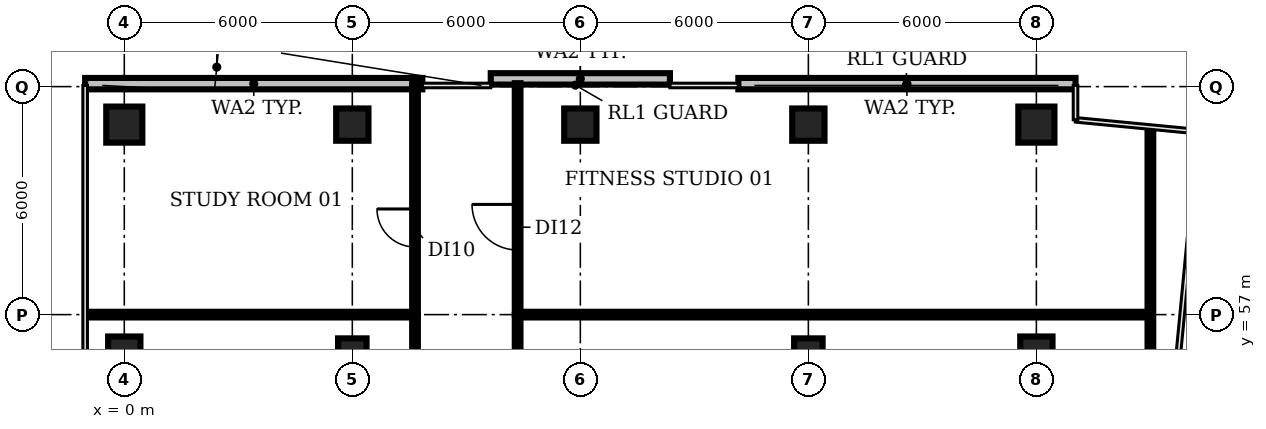
"""IFC4 building model, lengths in metres.
Left out: names, types, materials, properties, quantities, classifications, styles, units other than length and angle.
Written with IfcOpenShell. Run it as: python <this file> out.ifc"""

import sys

from ifc_helpers import new_model, si_unit, direction, frame, frame_2d, origin, origin_2d, place, context, subcontext, project, spatial, rectangle, circle, extrude, element, fill, save


model = new_model("IFC4")
c1 = context("Model", 3, precision=1e-05, world=origin(), true_north=direction((0.0, 1.0)))
c2 = subcontext(c1, "Body", "Model", "MODEL_VIEW")
j1 = project(units=[si_unit("LENGTHUNIT", "METRE"), si_unit("PLANEANGLEUNIT", "RADIAN")], contexts=[c1])
p1 = place(None, origin())
s1 = spatial("IfcSite", under=j1, at=p1, CompositionType="ELEMENT")
p2 = place(p1, origin())
s2 = spatial("IfcBuilding", under=s1, at=p2, CompositionType="ELEMENT")
p3 = place(p2, frame((0.0, 0.0, 264.2)))
s3 = spatial("IfcBuildingStorey", under=s2, at=p3, CompositionType="ELEMENT", Elevation=264.2)
p4 = place(p3, frame((0.0, 56.0, -0.35), z_axis=(0.0, 0.0, 1.0), x_axis=(1.0, 0.0, 0.0)))
e1 = element("IfcColumn", 1, at=p4, inside=s3, PredefinedType="COLUMN", context=c2, shape_type="SweptSolid", body=[
    extrude(rectangle(XDim=0.85, YDim=0.85, at=origin_2d()), origin(), (0.0, 0.0, 1.0), 4.2),
])
p5 = place(p3, frame((0.0, 62.0, -0.35), z_axis=(0.0, 0.0, 1.0), x_axis=(1.0, 0.0, 0.0)))
e2 = element("IfcColumn", 2, at=p5, inside=s3, PredefinedType="COLUMN", context=c2, shape_type="SweptSolid", body=[
    extrude(circle(Radius=0.475, at=origin_2d()), origin(), (0.0, 0.0, 1.0), 4.2),
])
p6 = place(p3, frame((6.0, 56.0, -0.35), z_axis=(0.0, 0.0, 1.0), x_axis=(1.0, 0.0, 0.0)))
e3 = element("IfcColumn", 3, at=p6, inside=s3, PredefinedType="COLUMN", context=c2, shape_type="SweptSolid", body=[
    extrude(rectangle(XDim=0.75, YDim=0.75, at=origin_2d()), origin(), (0.0, 0.0, 1.0), 4.2),
])
for number, where, z_axis, x_axis in (
    (4, (6.0, 62.0, -0.35), (0.0, 0.0, 1.0), (1.0, 0.0, 0.0)),
    (5, (12.0, 62.0, -0.35), (0.0, 0.0, 1.0), (1.0, 0.0, 0.0)),
):
    element("IfcColumn", number, at=place(p3, frame(where, z_axis=z_axis, x_axis=x_axis)), inside=s3, PredefinedType="COLUMN", context=c2, shape_type="SweptSolid", body=[
        extrude(rectangle(XDim=0.85, YDim=0.85, at=origin_2d()), origin(), (0.0, 0.0, 1.0), 4.2),
    ])
p7 = place(p3, frame((18.0, 56.0, -0.35), z_axis=(0.0, 0.0, 1.0), x_axis=(1.0, 0.0, 0.0)))
e6 = element("IfcColumn", 6, at=p7, inside=s3, PredefinedType="COLUMN", context=c2, shape_type="SweptSolid", body=[
    extrude(rectangle(XDim=0.75, YDim=0.75, at=origin_2d()), origin(), (0.0, 0.0, 1.0), 4.2),
])
for number, where, z_axis, x_axis in (
    (7, (18.0, 62.0, -0.35), (0.0, 0.0, 1.0), (1.0, 0.0, 0.0)),
    (8, (24.0, 56.0, -0.35), (0.0, 0.0, 1.0), (1.0, 0.0, 0.0)),
):
    element("IfcColumn", number, at=place(p3, frame(where, z_axis=z_axis, x_axis=x_axis)), inside=s3, PredefinedType="COLUMN", context=c2, shape_type="SweptSolid", body=[
        extrude(rectangle(XDim=0.85, YDim=0.85, at=origin_2d()), origin(), (0.0, 0.0, 1.0), 4.2),
    ])
p8 = place(p3, frame((24.0, 62.0, -0.35), z_axis=(0.0, 0.0, 1.0), x_axis=(1.0, 0.0, 0.0)))
e9 = element("IfcColumn", 9, at=p8, inside=s3, PredefinedType="COLUMN", context=c2, shape_type="SweptSolid", body=[
    extrude(circle(Radius=0.475, at=origin_2d()), origin(), (0.0, 0.0, 1.0), 4.2),
])
p9 = place(p3, frame((25.03, 63.078, 0.0), z_axis=(0.0, 0.0, 1.0), x_axis=(-1.0, 0.0, 0.0)))
e10 = element("IfcWall", 10, at=p9, inside=s3, PredefinedType="SOLIDWALL", context=c2, shape_type="SweptSolid", body=[
    extrude(rectangle(XDim=8.873, YDim=0.3, at=frame_2d((4.436, 0.0))), origin(), (0.0, 0.0, 1.0), 3.85),
])
p10 = place(p3, frame((14.357, 63.204, 0.0), z_axis=(0.0, 0.0, 1.0), x_axis=(-1.0, 0.0, 0.0)))
e11 = element("IfcWall", 11, at=p10, inside=s3, PredefinedType="SOLIDWALL", context=c2, shape_type="SweptSolid", body=[
    extrude(rectangle(XDim=4.715, YDim=0.3, at=frame_2d((2.357, 0.0))), origin(), (0.0, 0.0, 1.0), 3.85),
])
p11 = place(p3, frame((7.843, 63.078, 0.0), z_axis=(0.0, 0.0, 1.0), x_axis=(-1.0, 0.0, 0.0)))
e12 = element("IfcWall", 12, at=p11, inside=s3, PredefinedType="SOLIDWALL", context=c2, shape_type="SweptSolid", body=[
    extrude(rectangle(XDim=8.873, YDim=0.3, at=frame_2d((4.436, 0.0))), origin(), (0.0, 0.0, 1.0), 3.85),
])
p12 = place(p3, frame((-0.98, 57.0, 0.0), z_axis=(0.0, 0.0, 1.0), x_axis=(1.0, 0.0, 0.0)))
e13 = element("IfcWall", 13, at=p12, inside=s3, PredefinedType="PARTITIONING", context=c2, shape_type="SweptSolid", body=[
    extrude(rectangle(XDim=8.63, YDim=0.15, at=frame_2d((4.315, 0.0))), origin(), (0.0, 0.0, 1.0), 2.9),
])
p13 = place(p3, frame((7.65, 57.0, 0.0), z_axis=(0.0, 0.0, 1.0), x_axis=(0.0, -1.0, 0.0)))
e14 = element("IfcWall", 14, at=p13, inside=s3, PredefinedType="PARTITIONING", context=c2, shape_type="SweptSolid", body=[
    extrude(rectangle(XDim=12.0, YDim=0.15, at=frame_2d((6.0, 0.0))), origin(), (0.0, 0.0, 1.0), 2.9),
])
p14 = place(p13, frame((5.3, 0.0, 0.0)))
e15 = element("IfcOpeningElement", 15, at=p14, cuts=e14, PredefinedType="OPENING", context=c2, shape_type="SweptSolid", body=[
    extrude(rectangle(XDim=1.2, YDim=2.1, at=frame_2d((0.6, 1.05))), frame((0.0, 0.085, 0.0), z_axis=(0.0, -1.0, 0.0), x_axis=(1.0, 0.0, 0.0)), (0.0, 0.0, 1.0), 0.17),
])
p15 = place(p3, frame((7.65, 57.0, 0.0), z_axis=(0.0, 0.0, 1.0), x_axis=(0.0, 1.0, 0.0)))
e16 = element("IfcWall", 16, at=p15, inside=s3, PredefinedType="PARTITIONING", context=c2, shape_type="SweptSolid", body=[
    extrude(rectangle(XDim=6.09, YDim=0.15, at=frame_2d((3.045, 0.0))), origin(), (0.0, 0.0, 1.0), 2.9),
])
p16 = place(p15, frame((1.78, 0.0, 0.0)))
e17 = element("IfcOpeningElement", 17, at=p16, cuts=e16, PredefinedType="OPENING", context=c2, shape_type="SweptSolid", body=[
    extrude(rectangle(XDim=1.0, YDim=2.1, at=frame_2d((0.5, 1.05))), frame((0.0, 0.085, 0.0), z_axis=(0.0, -1.0, 0.0), x_axis=(1.0, 0.0, 0.0)), (0.0, 0.0, 1.0), 0.17),
])
p17 = place(p3, frame((10.35, 45.0, 0.0), z_axis=(0.0, 0.0, 1.0), x_axis=(0.0, 1.0, 0.0)))
e18 = element("IfcWall", 18, at=p17, inside=s3, PredefinedType="PARTITIONING", context=c2, shape_type="SweptSolid", body=[
    extrude(rectangle(XDim=12.0, YDim=0.15, at=frame_2d((6.0, 0.0))), origin(), (0.0, 0.0, 1.0), 2.9),
])
p18 = place(p17, frame((5.3, 0.0, 0.0)))
e19 = element("IfcOpeningElement", 19, at=p18, cuts=e18, PredefinedType="OPENING", context=c2, shape_type="SweptSolid", body=[
    extrude(rectangle(XDim=1.2, YDim=2.1, at=frame_2d((0.6, 1.05))), frame((0.0, 0.085, 0.0), z_axis=(0.0, -1.0, 0.0), x_axis=(1.0, 0.0, 0.0)), (0.0, 0.0, 1.0), 0.17),
])
p19 = place(p3, frame((10.35, 57.0, 0.0), z_axis=(0.0, 0.0, 1.0), x_axis=(0.0, 1.0, 0.0)))
e20 = element("IfcWall", 20, at=p19, inside=s3, PredefinedType="PARTITIONING", context=c2, shape_type="SweptSolid", body=[
    extrude(rectangle(XDim=6.09, YDim=0.15, at=frame_2d((3.045, 0.0))), origin(), (0.0, 0.0, 1.0), 2.9),
])
p20 = place(p19, frame((1.7, 0.0, 0.0)))
e21 = element("IfcOpeningElement", 21, at=p20, cuts=e20, PredefinedType="OPENING", context=c2, shape_type="SweptSolid", body=[
    extrude(rectangle(XDim=1.2, YDim=2.1, at=frame_2d((0.6, 1.05))), frame((0.0, 0.085, 0.0), z_axis=(0.0, -1.0, 0.0), x_axis=(1.0, 0.0, 0.0)), (0.0, 0.0, 1.0), 0.17),
])
p21 = place(p3, frame((10.35, 57.0, 0.0), z_axis=(0.0, 0.0, 1.0), x_axis=(1.0, 0.0, 0.0)))
e22 = element("IfcWall", 22, at=p21, inside=s3, PredefinedType="PARTITIONING", context=c2, shape_type="SweptSolid", body=[
    extrude(rectangle(XDim=16.65, YDim=0.15, at=frame_2d((8.325, 0.0))), origin(), (0.0, 0.0, 1.0), 2.9),
])
p22 = place(p3, frame((27.0, 48.942, 0.0), z_axis=(0.0, 0.0, 1.0), x_axis=(0.0, 1.0, 0.0)))
e23 = element("IfcWall", 23, at=p22, inside=s3, PredefinedType="PARTITIONING", context=c2, shape_type="SweptSolid", body=[
    extrude(rectangle(XDim=12.948, YDim=0.15, at=frame_2d((6.474, 0.0))), origin(), (0.0, 0.0, 1.0), 2.9),
])
p23 = place(p16, origin())
e24 = element("IfcDoor", 24, at=p23, inside=s3, OperationType="SINGLE_SWING_RIGHT", PredefinedType="DOOR", context=c2, shape_type="SweptSolid", body=[
    extrude(rectangle(XDim=1.0, YDim=2.1, at=frame_2d((0.5, 1.05))), frame((0.0, 0.025, 0.0), z_axis=(0.0, -1.0, 0.0), x_axis=(1.0, 0.0, 0.0)), (0.0, 0.0, 1.0), 0.05),
])
fill(e17, e24)
p24 = place(p20, origin())
e25 = element("IfcDoor", 25, at=p24, inside=s3, OperationType="SINGLE_SWING_RIGHT", PredefinedType="DOOR", context=c2, shape_type="SweptSolid", body=[
    extrude(rectangle(XDim=1.2, YDim=2.1, at=frame_2d((0.6, 1.05))), frame((0.0, 0.025, 0.0), z_axis=(0.0, -1.0, 0.0), x_axis=(1.0, 0.0, 0.0)), (0.0, 0.0, 1.0), 0.05),
])
fill(e21, e25)
save(model, sys.argv[1])
